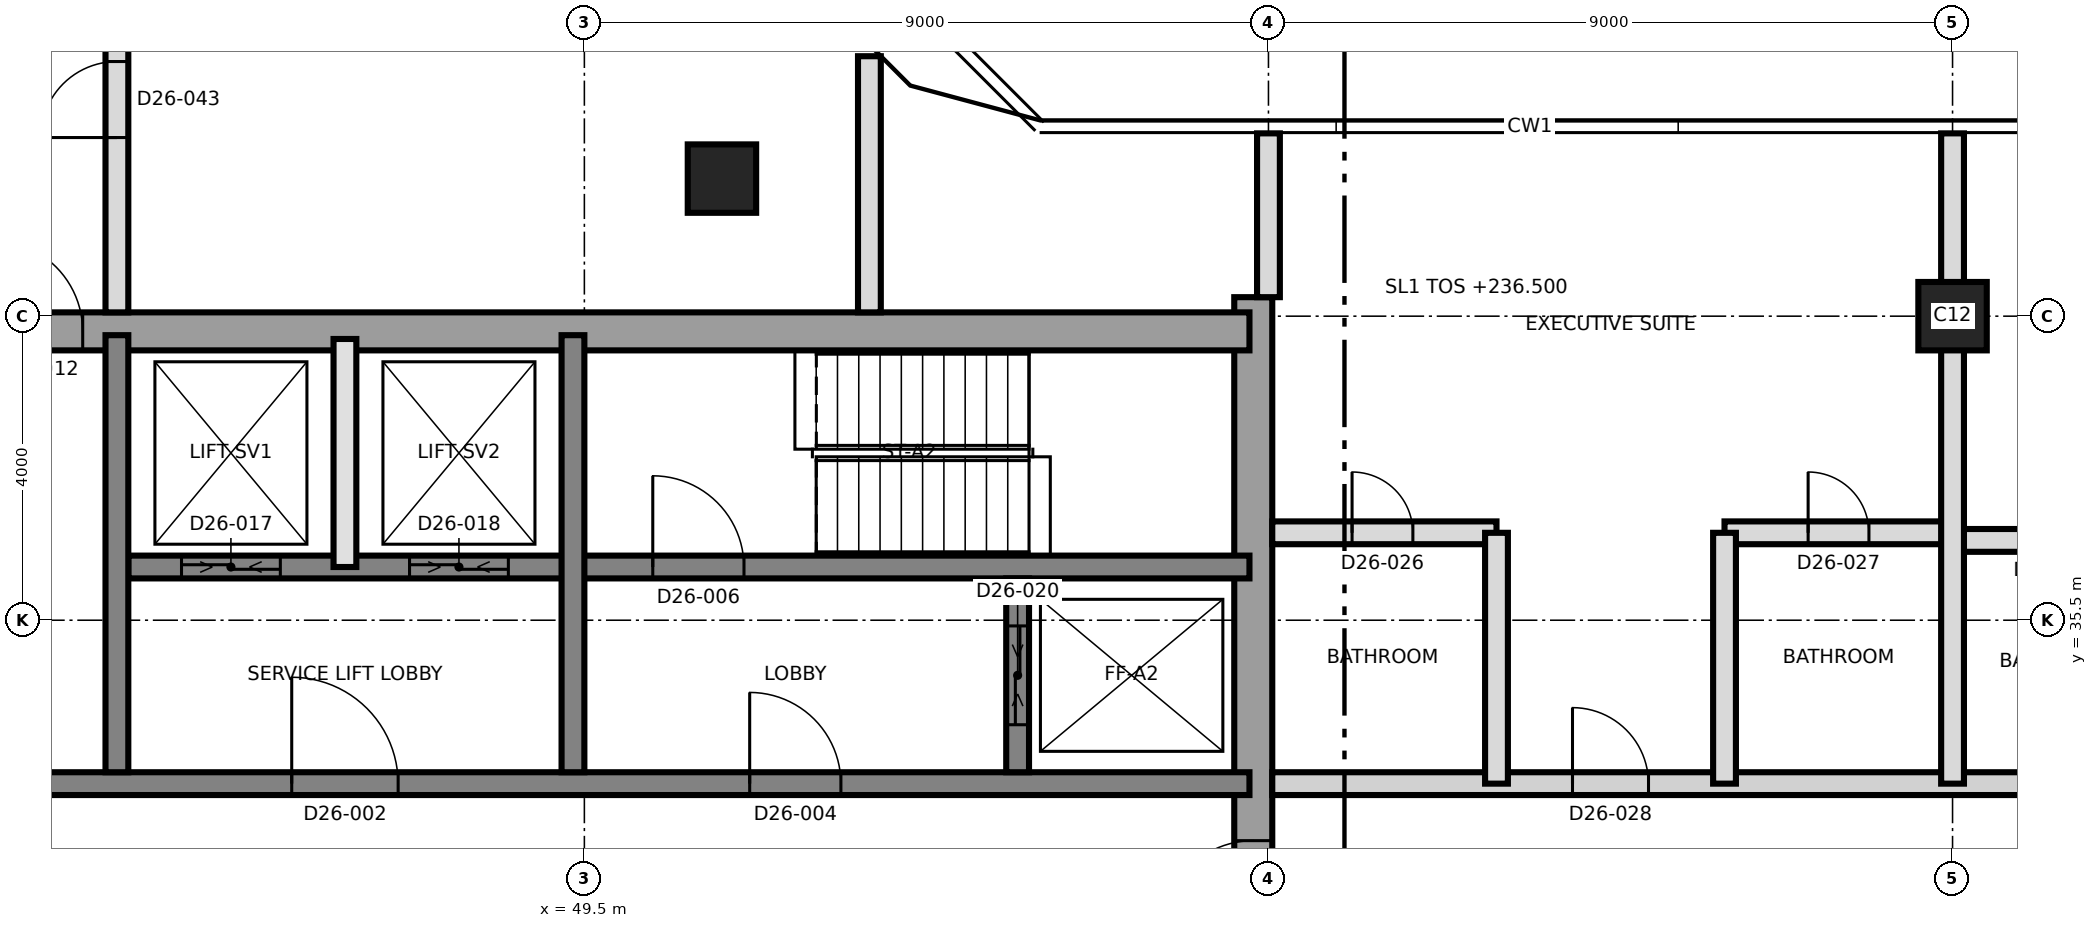
"""IFC4 building model, lengths in metres.
Left out: names, types, materials, properties, quantities, classifications, styles, units other than length and angle.
Written with IfcOpenShell. Run it as: python <this file> out.ifc"""

import sys

from ifc_helpers import new_model, si_unit, direction, frame, frame_2d, origin, origin_2d, place, context, subcontext, project, spatial, rectangle, extrude, element, fill, save


model = new_model("IFC4")
c1 = context("Model", 3, precision=1e-05, world=origin(), true_north=direction((0.0, 1.0)))
c2 = subcontext(c1, "Body", "Model", "MODEL_VIEW")
j1 = project(units=[si_unit("LENGTHUNIT", "METRE"), si_unit("PLANEANGLEUNIT", "RADIAN")], contexts=[c1])
p1 = place(None, origin())
s1 = spatial("IfcSite", under=j1, at=p1, CompositionType="ELEMENT")
p2 = place(p1, origin())
s2 = spatial("IfcBuilding", under=s1, at=p2, CompositionType="ELEMENT")
p3 = place(p2, frame((0.0, 0.0, 236.5)))
s3 = spatial("IfcBuildingStorey", under=s2, at=p3, CompositionType="ELEMENT", Elevation=236.5)
p4 = place(p3, frame((58.3, 21.25, 0.0), z_axis=(0.0, 0.0, 1.0), x_axis=(0.0, 1.0, 0.0)))
e1 = element("IfcWall", 1, at=p4, inside=s3, PredefinedType="SHEAR", context=c2, shape_type="SweptSolid", body=[
    extrude(rectangle(XDim=18.5, YDim=0.5, at=frame_2d((9.25, 0.0))), origin(), (0.0, 0.0, 1.0), 3.7),
])
p5 = place(p4, frame((10.15, 0.0, 0.0)))
e2 = element("IfcOpeningElement", 2, at=p5, cuts=e1, PredefinedType="OPENING", context=c2, shape_type="SweptSolid", body=[
    extrude(rectangle(XDim=1.2, YDim=2.1, at=frame_2d((0.6, 1.05))), frame((0.0, 0.26, 0.0), z_axis=(0.0, -1.0, 0.0), x_axis=(1.0, 0.0, 0.0)), (0.0, 0.0, 1.0), 0.52),
])
p6 = place(p3, frame((31.25, 39.3, 0.0), z_axis=(0.0, 0.0, 1.0), x_axis=(1.0, 0.0, 0.0)))
e3 = element("IfcWall", 3, at=p6, inside=s3, PredefinedType="SHEAR", context=c2, shape_type="SweptSolid", body=[
    extrude(rectangle(XDim=27.0, YDim=0.5, at=frame_2d((13.5, 0.0))), origin(), (0.0, 0.0, 1.0), 3.7),
])
p7 = place(p6, frame((10.45, 0.0, 0.0)))
e4 = element("IfcOpeningElement", 4, at=p7, cuts=e3, PredefinedType="OPENING", context=c2, shape_type="SweptSolid", body=[
    extrude(rectangle(XDim=1.2, YDim=2.1, at=frame_2d((0.6, 1.05))), frame((0.0, 0.26, 0.0), z_axis=(0.0, -1.0, 0.0), x_axis=(1.0, 0.0, 0.0)), (0.0, 0.0, 1.0), 0.52),
])
p8 = place(p3, frame((31.75, 33.35, 0.0), z_axis=(0.0, 0.0, 1.0), x_axis=(1.0, 0.0, 0.0)))
e5 = element("IfcWall", 5, at=p8, inside=s3, PredefinedType="SHEAR", context=c2, shape_type="SweptSolid", body=[
    extrude(rectangle(XDim=26.5, YDim=0.3, at=frame_2d((13.25, 0.0))), origin(), (0.0, 0.0, 1.0), 3.7),
])
p9 = place(p8, frame((13.9, 0.0, 0.0)))
e6 = element("IfcOpeningElement", 6, at=p9, cuts=e5, PredefinedType="OPENING", context=c2, shape_type="SweptSolid", body=[
    extrude(rectangle(XDim=1.4, YDim=2.1, at=frame_2d((0.7, 1.05))), frame((0.0, 0.16, 0.0), z_axis=(0.0, -1.0, 0.0), x_axis=(1.0, 0.0, 0.0)), (0.0, 0.0, 1.0), 0.32),
])
p10 = place(p8, frame((5.375, 0.0, 0.0)))
e7 = element("IfcOpeningElement", 7, at=p10, cuts=e5, PredefinedType="OPENING", context=c2, shape_type="SweptSolid", body=[
    extrude(rectangle(XDim=1.2, YDim=2.1, at=frame_2d((0.6, 1.05))), frame((0.0, 0.16, 0.0), z_axis=(0.0, -1.0, 0.0), x_axis=(1.0, 0.0, 0.0)), (0.0, 0.0, 1.0), 0.32),
])
p11 = place(p8, frame((19.925, 0.0, 0.0)))
e8 = element("IfcOpeningElement", 8, at=p11, cuts=e5, PredefinedType="OPENING", context=c2, shape_type="SweptSolid", body=[
    extrude(rectangle(XDim=1.2, YDim=2.1, at=frame_2d((0.6, 1.05))), frame((0.0, 0.16, 0.0), z_axis=(0.0, -1.0, 0.0), x_axis=(1.0, 0.0, 0.0)), (0.0, 0.0, 1.0), 0.32),
])
p12 = place(p3, frame((43.5, 36.2, 0.0), z_axis=(0.0, 0.0, 1.0), x_axis=(1.0, 0.0, 0.0)))
e9 = element("IfcWall", 9, at=p12, inside=s3, PredefinedType="SHEAR", context=c2, shape_type="SweptSolid", body=[
    extrude(rectangle(XDim=14.75, YDim=0.3, at=frame_2d((7.375, 0.0))), origin(), (0.0, 0.0, 1.0), 3.7),
])
p13 = place(p12, frame((6.9, 0.0, 0.0)))
e10 = element("IfcOpeningElement", 10, at=p13, cuts=e9, PredefinedType="OPENING", context=c2, shape_type="SweptSolid", body=[
    extrude(rectangle(XDim=1.2, YDim=2.1, at=frame_2d((0.6, 1.05))), frame((0.0, 0.16, 0.0), z_axis=(0.0, -1.0, 0.0), x_axis=(1.0, 0.0, 0.0)), (0.0, 0.0, 1.0), 0.32),
])
p14 = place(p12, frame((0.7, 0.0, 0.0)))
e11 = element("IfcOpeningElement", 11, at=p14, cuts=e9, PredefinedType="OPENING", context=c2, shape_type="SweptSolid", body=[
    extrude(rectangle(XDim=1.3, YDim=2.4, at=frame_2d((0.65, 1.2))), frame((0.0, 0.16, 0.0), z_axis=(0.0, -1.0, 0.0), x_axis=(1.0, 0.0, 0.0)), (0.0, 0.0, 1.0), 0.32),
])
p15 = place(p12, frame((3.7, 0.0, 0.0)))
e12 = element("IfcOpeningElement", 12, at=p15, cuts=e9, PredefinedType="OPENING", context=c2, shape_type="SweptSolid", body=[
    extrude(rectangle(XDim=1.3, YDim=2.4, at=frame_2d((0.65, 1.2))), frame((0.0, 0.16, 0.0), z_axis=(0.0, -1.0, 0.0), x_axis=(1.0, 0.0, 0.0)), (0.0, 0.0, 1.0), 0.32),
])
for number, where, z_axis, x_axis in (
    (13, (43.35, 33.5, 0.0), (0.0, 0.0, 1.0), (0.0, 1.0, 0.0)),
    (14, (49.35, 33.5, 0.0), (0.0, 0.0, 1.0), (0.0, 1.0, 0.0)),
):
    element("IfcWall", number, at=place(p3, frame(where, z_axis=z_axis, x_axis=x_axis)), inside=s3, PredefinedType="SHEAR", context=c2, shape_type="SweptSolid", body=[
        extrude(rectangle(XDim=5.75, YDim=0.3, at=frame_2d((2.875, 0.0))), origin(), (0.0, 0.0, 1.0), 3.7),
    ])
p16 = place(p3, frame((55.2, 33.5, 0.0), z_axis=(0.0, 0.0, 1.0), x_axis=(0.0, 1.0, 0.0)))
e15 = element("IfcWall", 15, at=p16, inside=s3, PredefinedType="SHEAR", context=c2, shape_type="SweptSolid", body=[
    extrude(rectangle(XDim=2.55, YDim=0.3, at=frame_2d((1.275, 0.0))), origin(), (0.0, 0.0, 1.0), 3.7),
])
p17 = place(p16, frame((0.625, 0.0, 0.0)))
e16 = element("IfcOpeningElement", 16, at=p17, cuts=e15, PredefinedType="OPENING", context=c2, shape_type="SweptSolid", body=[
    extrude(rectangle(XDim=1.3, YDim=2.4, at=frame_2d((0.65, 1.2))), frame((0.0, 0.16, 0.0), z_axis=(0.0, -1.0, 0.0), x_axis=(1.0, 0.0, 0.0)), (0.0, 0.0, 1.0), 0.32),
])
for number, where, z_axis, x_axis in (
    (17, (67.5, 39.5, 0.0), (0.0, 0.0, 1.0), (1.0, 0.0, 0.0)),
    (18, (51.31, 41.31, 0.0), (0.0, 0.0, 1.0), (1.0, 0.0, 0.0)),
):
    element("IfcColumn", number, at=place(p3, frame(where, z_axis=z_axis, x_axis=x_axis)), inside=s3, PredefinedType="COLUMN", context=c2, shape_type="SweptSolid", body=[
        extrude(rectangle(XDim=0.9, YDim=0.9, at=origin_2d()), origin(), (0.0, 0.0, 1.0), 3.7),
    ])
p18 = place(p3, frame((46.35, 36.2, 0.0), z_axis=(0.0, 0.0, 1.0), x_axis=(0.0, 1.0, 0.0)))
e19 = element("IfcWall", 19, at=p18, inside=s3, PredefinedType="SOLIDWALL", context=c2, shape_type="SweptSolid", body=[
    extrude(rectangle(XDim=3.0, YDim=0.3, at=frame_2d((1.5, 0.0))), origin(), (0.0, 0.0, 1.0), 3.4),
])
p19 = place(p3, frame((58.55, 33.35, 0.0), z_axis=(0.0, 0.0, 1.0), x_axis=(1.0, 0.0, 0.0)))
e20 = element("IfcWall", 20, at=p19, inside=s3, PredefinedType="PARTITIONING", context=c2, shape_type="SweptSolid", body=[
    extrude(rectangle(XDim=26.78, YDim=0.3, at=frame_2d((13.39, 0.0))), origin(), (0.0, 0.0, 1.0), 3.4),
])
p20 = place(p19, frame((3.95, 0.0, 0.0)))
e21 = element("IfcOpeningElement", 21, at=p20, cuts=e20, PredefinedType="OPENING", context=c2, shape_type="SweptSolid", body=[
    extrude(rectangle(XDim=1.0, YDim=2.4, at=frame_2d((0.5, 1.2))), frame((0.0, 0.16, 0.0), z_axis=(0.0, -1.0, 0.0), x_axis=(1.0, 0.0, 0.0)), (0.0, 0.0, 1.0), 0.32),
])
p21 = place(p19, frame((12.365, 0.0, 0.0)))
e22 = element("IfcOpeningElement", 22, at=p21, cuts=e20, PredefinedType="OPENING", context=c2, shape_type="SweptSolid", body=[
    extrude(rectangle(XDim=1.0, YDim=2.1, at=frame_2d((0.5, 1.05))), frame((0.0, 0.16, 0.0), z_axis=(0.0, -1.0, 0.0), x_axis=(1.0, 0.0, 0.0)), (0.0, 0.0, 1.0), 0.32),
])
p22 = place(p19, frame((15.315, 0.0, 0.0)))
e23 = element("IfcOpeningElement", 23, at=p22, cuts=e20, PredefinedType="OPENING", context=c2, shape_type="SweptSolid", body=[
    extrude(rectangle(XDim=1.4, YDim=2.1, at=frame_2d((0.7, 1.05))), frame((0.0, 0.16, 0.0), z_axis=(0.0, -1.0, 0.0), x_axis=(1.0, 0.0, 0.0)), (0.0, 0.0, 1.0), 0.32),
])
p23 = place(p19, frame((19.1, 0.0, 0.0)))
e24 = element("IfcOpeningElement", 24, at=p23, cuts=e20, PredefinedType="OPENING", context=c2, shape_type="SweptSolid", body=[
    extrude(rectangle(XDim=1.0, YDim=2.1, at=frame_2d((0.5, 1.05))), frame((0.0, 0.16, 0.0), z_axis=(0.0, -1.0, 0.0), x_axis=(1.0, 0.0, 0.0)), (0.0, 0.0, 1.0), 0.32),
])
p24 = place(p19, frame((24.95, 0.0, 0.0)))
e25 = element("IfcOpeningElement", 25, at=p24, cuts=e20, PredefinedType="OPENING", context=c2, shape_type="SweptSolid", body=[
    extrude(rectangle(XDim=1.0, YDim=2.1, at=frame_2d((0.5, 1.05))), frame((0.0, 0.16, 0.0), z_axis=(0.0, -1.0, 0.0), x_axis=(1.0, 0.0, 0.0)), (0.0, 0.0, 1.0), 0.32),
])
p25 = place(p3, frame((67.5, 36.55, 0.0), z_axis=(0.0, 0.0, 1.0), x_axis=(1.0, 0.0, 0.0)))
e26 = element("IfcWall", 26, at=p25, inside=s3, PredefinedType="PARTITIONING", context=c2, shape_type="SweptSolid", body=[
    extrude(rectangle(XDim=2.7, YDim=0.3, at=frame_2d((1.35, 0.0))), origin(), (0.0, 0.0, 1.0), 3.4),
])
p26 = place(p25, frame((0.95, 0.0, 0.0)))
e27 = element("IfcOpeningElement", 27, at=p26, cuts=e26, PredefinedType="OPENING", context=c2, shape_type="SweptSolid", body=[
    extrude(rectangle(XDim=0.8, YDim=2.1, at=frame_2d((0.4, 1.05))), frame((0.0, 0.16, 0.0), z_axis=(0.0, -1.0, 0.0), x_axis=(1.0, 0.0, 0.0)), (0.0, 0.0, 1.0), 0.32),
])
p27 = place(p3, frame((58.55, 36.65, 0.0), z_axis=(0.0, 0.0, 1.0), x_axis=(1.0, 0.0, 0.0)))
e28 = element("IfcWall", 28, at=p27, inside=s3, PredefinedType="PARTITIONING", context=c2, shape_type="SweptSolid", body=[
    extrude(rectangle(XDim=2.95, YDim=0.3, at=frame_2d((1.475, 0.0))), origin(), (0.0, 0.0, 1.0), 3.4),
])
p28 = place(p27, frame((1.05, 0.0, 0.0)))
e29 = element("IfcOpeningElement", 29, at=p28, cuts=e28, PredefinedType="OPENING", context=c2, shape_type="SweptSolid", body=[
    extrude(rectangle(XDim=0.8, YDim=2.1, at=frame_2d((0.4, 1.05))), frame((0.0, 0.16, 0.0), z_axis=(0.0, -1.0, 0.0), x_axis=(1.0, 0.0, 0.0)), (0.0, 0.0, 1.0), 0.32),
])
p29 = place(p3, frame((64.5, 36.65, 0.0), z_axis=(0.0, 0.0, 1.0), x_axis=(1.0, 0.0, 0.0)))
e30 = element("IfcWall", 30, at=p29, inside=s3, PredefinedType="PARTITIONING", context=c2, shape_type="SweptSolid", body=[
    extrude(rectangle(XDim=3.0, YDim=0.3, at=frame_2d((1.5, 0.0))), origin(), (0.0, 0.0, 1.0), 3.4),
])
p30 = place(p29, frame((1.1, 0.0, 0.0)))
e31 = element("IfcOpeningElement", 31, at=p30, cuts=e30, PredefinedType="OPENING", context=c2, shape_type="SweptSolid", body=[
    extrude(rectangle(XDim=0.8, YDim=2.1, at=frame_2d((0.4, 1.05))), frame((0.0, 0.16, 0.0), z_axis=(0.0, -1.0, 0.0), x_axis=(1.0, 0.0, 0.0)), (0.0, 0.0, 1.0), 0.32),
])
p31 = place(p3, frame((43.35, 39.55, 0.0), z_axis=(0.0, 0.0, 1.0), x_axis=(0.0, 1.0, 0.0)))
e32 = element("IfcWall", 32, at=p31, inside=s3, PredefinedType="PARTITIONING", context=c2, shape_type="SweptSolid", body=[
    extrude(rectangle(XDim=19.0, YDim=0.3, at=frame_2d((9.5, 0.0))), origin(), (0.0, 0.0, 1.0), 3.4),
])
p32 = place(p31, frame((2.3, 0.0, 0.0)))
e33 = element("IfcOpeningElement", 33, at=p32, cuts=e32, PredefinedType="OPENING", context=c2, shape_type="SweptSolid", body=[
    extrude(rectangle(XDim=1.0, YDim=2.4, at=frame_2d((0.5, 1.2))), frame((0.0, 0.16, 0.0), z_axis=(0.0, -1.0, 0.0), x_axis=(1.0, 0.0, 0.0)), (0.0, 0.0, 1.0), 0.32),
])
p33 = place(p31, frame((14.6, 0.0, 0.0)))
e34 = element("IfcOpeningElement", 34, at=p33, cuts=e32, PredefinedType="OPENING", context=c2, shape_type="SweptSolid", body=[
    extrude(rectangle(XDim=1.0, YDim=2.4, at=frame_2d((0.5, 1.2))), frame((0.0, 0.16, 0.0), z_axis=(0.0, -1.0, 0.0), x_axis=(1.0, 0.0, 0.0)), (0.0, 0.0, 1.0), 0.32),
])
p34 = place(p3, frame((53.25, 39.55, 0.0), z_axis=(0.0, 0.0, 1.0), x_axis=(0.0, 1.0, 0.0)))
e35 = element("IfcWall", 35, at=p34, inside=s3, PredefinedType="PARTITIONING", context=c2, shape_type="SweptSolid", body=[
    extrude(rectangle(XDim=3.37, YDim=0.3, at=frame_2d((1.685, 0.0))), origin(), (0.0, 0.0, 1.0), 3.4),
])
p35 = place(p3, frame((58.5, 39.75, 0.0), z_axis=(0.0, 0.0, 1.0), x_axis=(0.0, 1.0, 0.0)))
e36 = element("IfcWall", 36, at=p35, inside=s3, PredefinedType="PARTITIONING", context=c2, shape_type="SweptSolid", body=[
    extrude(rectangle(XDim=2.155, YDim=0.3, at=frame_2d((1.078, 0.0))), origin(), (0.0, 0.0, 1.0), 3.4),
])
for number, where, z_axis, x_axis in (
    (37, (61.5, 33.35, 0.0), (0.0, 0.0, 1.0), (0.0, 1.0, 0.0)),
    (38, (64.5, 33.35, 0.0), (0.0, 0.0, 1.0), (0.0, 1.0, 0.0)),
):
    element("IfcWall", number, at=place(p3, frame(where, z_axis=z_axis, x_axis=x_axis)), inside=s3, PredefinedType="PARTITIONING", context=c2, shape_type="SweptSolid", body=[
        extrude(rectangle(XDim=3.3, YDim=0.3, at=frame_2d((1.65, 0.0))), origin(), (0.0, 0.0, 1.0), 3.4),
    ])
p36 = place(p3, frame((67.5, 33.35, 0.0), z_axis=(0.0, 0.0, 1.0), x_axis=(0.0, 1.0, 0.0)))
e39 = element("IfcWall", 39, at=p36, inside=s3, PredefinedType="PARTITIONING", context=c2, shape_type="SweptSolid", body=[
    extrude(rectangle(XDim=8.555, YDim=0.3, at=frame_2d((4.277, 0.0))), origin(), (0.0, 0.0, 1.0), 3.4),
])
p37 = place(p9, origin())
e40 = element("IfcDoor", 40, at=p37, inside=s3, OperationType="SINGLE_SWING_RIGHT", PredefinedType="DOOR", context=c2, shape_type="SweptSolid", body=[
    extrude(rectangle(XDim=1.4, YDim=2.1, at=frame_2d((0.7, 1.05))), frame((0.0, 0.025, 0.0), z_axis=(0.0, -1.0, 0.0), x_axis=(1.0, 0.0, 0.0)), (0.0, 0.0, 1.0), 0.05),
])
fill(e6, e40)
p38 = place(p11, origin())
e41 = element("IfcDoor", 41, at=p38, inside=s3, OperationType="SINGLE_SWING_RIGHT", PredefinedType="DOOR", context=c2, shape_type="SweptSolid", body=[
    extrude(rectangle(XDim=1.2, YDim=2.1, at=frame_2d((0.6, 1.05))), frame((0.0, 0.025, 0.0), z_axis=(0.0, -1.0, 0.0), x_axis=(1.0, 0.0, 0.0)), (0.0, 0.0, 1.0), 0.05),
])
fill(e8, e41)
p39 = place(p13, origin())
e42 = element("IfcDoor", 42, at=p39, inside=s3, OperationType="SINGLE_SWING_LEFT", PredefinedType="DOOR", context=c2, shape_type="SweptSolid", body=[
    extrude(rectangle(XDim=1.2, YDim=2.1, at=frame_2d((0.6, 1.05))), frame((0.0, 0.025, 0.0), z_axis=(0.0, -1.0, 0.0), x_axis=(1.0, 0.0, 0.0)), (0.0, 0.0, 1.0), 0.05),
])
fill(e10, e42)
p40 = place(p5, origin())
e43 = element("IfcDoor", 43, at=p40, inside=s3, OperationType="SINGLE_SWING_LEFT", PredefinedType="DOOR", context=c2, shape_type="SweptSolid", body=[
    extrude(rectangle(XDim=1.2, YDim=2.1, at=frame_2d((0.6, 1.05))), frame((0.0, 0.025, 0.0), z_axis=(0.0, -1.0, 0.0), x_axis=(1.0, 0.0, 0.0)), (0.0, 0.0, 1.0), 0.05),
])
fill(e2, e43)
p41 = place(p7, origin())
e44 = element("IfcDoor", 44, at=p41, inside=s3, OperationType="SINGLE_SWING_RIGHT", PredefinedType="DOOR", context=c2, shape_type="SweptSolid", body=[
    extrude(rectangle(XDim=1.2, YDim=2.1, at=frame_2d((0.6, 1.05))), frame((0.0, 0.025, 0.0), z_axis=(0.0, -1.0, 0.0), x_axis=(1.0, 0.0, 0.0)), (0.0, 0.0, 1.0), 0.05),
])
fill(e4, e44)
p42 = place(p14, origin())
e45 = element("IfcDoor", 45, at=p42, inside=s3, OperationType="SLIDING_TO_LEFT", PredefinedType="DOOR", context=c2, shape_type="SweptSolid", body=[
    extrude(rectangle(XDim=1.3, YDim=2.4, at=frame_2d((0.65, 1.2))), frame((0.0, 0.025, 0.0), z_axis=(0.0, -1.0, 0.0), x_axis=(1.0, 0.0, 0.0)), (0.0, 0.0, 1.0), 0.05),
])
fill(e11, e45)
p43 = place(p15, origin())
e46 = element("IfcDoor", 46, at=p43, inside=s3, OperationType="SLIDING_TO_LEFT", PredefinedType="DOOR", context=c2, shape_type="SweptSolid", body=[
    extrude(rectangle(XDim=1.3, YDim=2.4, at=frame_2d((0.65, 1.2))), frame((0.0, 0.025, 0.0), z_axis=(0.0, -1.0, 0.0), x_axis=(1.0, 0.0, 0.0)), (0.0, 0.0, 1.0), 0.05),
])
fill(e12, e46)
p44 = place(p17, origin())
e47 = element("IfcDoor", 47, at=p44, inside=s3, OperationType="SLIDING_TO_LEFT", PredefinedType="DOOR", context=c2, shape_type="SweptSolid", body=[
    extrude(rectangle(XDim=1.3, YDim=2.4, at=frame_2d((0.65, 1.2))), frame((0.0, 0.025, 0.0), z_axis=(0.0, -1.0, 0.0), x_axis=(1.0, 0.0, 0.0)), (0.0, 0.0, 1.0), 0.05),
])
fill(e16, e47)
p45 = place(p28, origin())
e48 = element("IfcDoor", 48, at=p45, inside=s3, OperationType="SINGLE_SWING_LEFT", PredefinedType="DOOR", context=c2, shape_type="SweptSolid", body=[
    extrude(rectangle(XDim=0.8, YDim=2.1, at=frame_2d((0.4, 1.05))), frame((0.0, 0.025, 0.0), z_axis=(0.0, -1.0, 0.0), x_axis=(1.0, 0.0, 0.0)), (0.0, 0.0, 1.0), 0.05),
])
fill(e29, e48)
p46 = place(p30, origin())
e49 = element("IfcDoor", 49, at=p46, inside=s3, OperationType="SINGLE_SWING_RIGHT", PredefinedType="DOOR", context=c2, shape_type="SweptSolid", body=[
    extrude(rectangle(XDim=0.8, YDim=2.1, at=frame_2d((0.4, 1.05))), frame((0.0, 0.025, 0.0), z_axis=(0.0, -1.0, 0.0), x_axis=(1.0, 0.0, 0.0)), (0.0, 0.0, 1.0), 0.05),
])
fill(e31, e49)
p47 = place(p20, origin())
e50 = element("IfcDoor", 50, at=p47, inside=s3, OperationType="SINGLE_SWING_LEFT", PredefinedType="DOOR", context=c2, shape_type="SweptSolid", body=[
    extrude(rectangle(XDim=1.0, YDim=2.4, at=frame_2d((0.5, 1.2))), frame((0.0, 0.025, 0.0), z_axis=(0.0, -1.0, 0.0), x_axis=(1.0, 0.0, 0.0)), (0.0, 0.0, 1.0), 0.05),
])
fill(e21, e50)
p48 = place(p32, origin())
e51 = element("IfcDoor", 51, at=p48, inside=s3, OperationType="SINGLE_SWING_LEFT", PredefinedType="DOOR", context=c2, shape_type="SweptSolid", body=[
    extrude(rectangle(XDim=1.0, YDim=2.4, at=frame_2d((0.5, 1.2))), frame((0.0, 0.025, 0.0), z_axis=(0.0, -1.0, 0.0), x_axis=(1.0, 0.0, 0.0)), (0.0, 0.0, 1.0), 0.05),
])
fill(e33, e51)
save(model, sys.argv[1])
